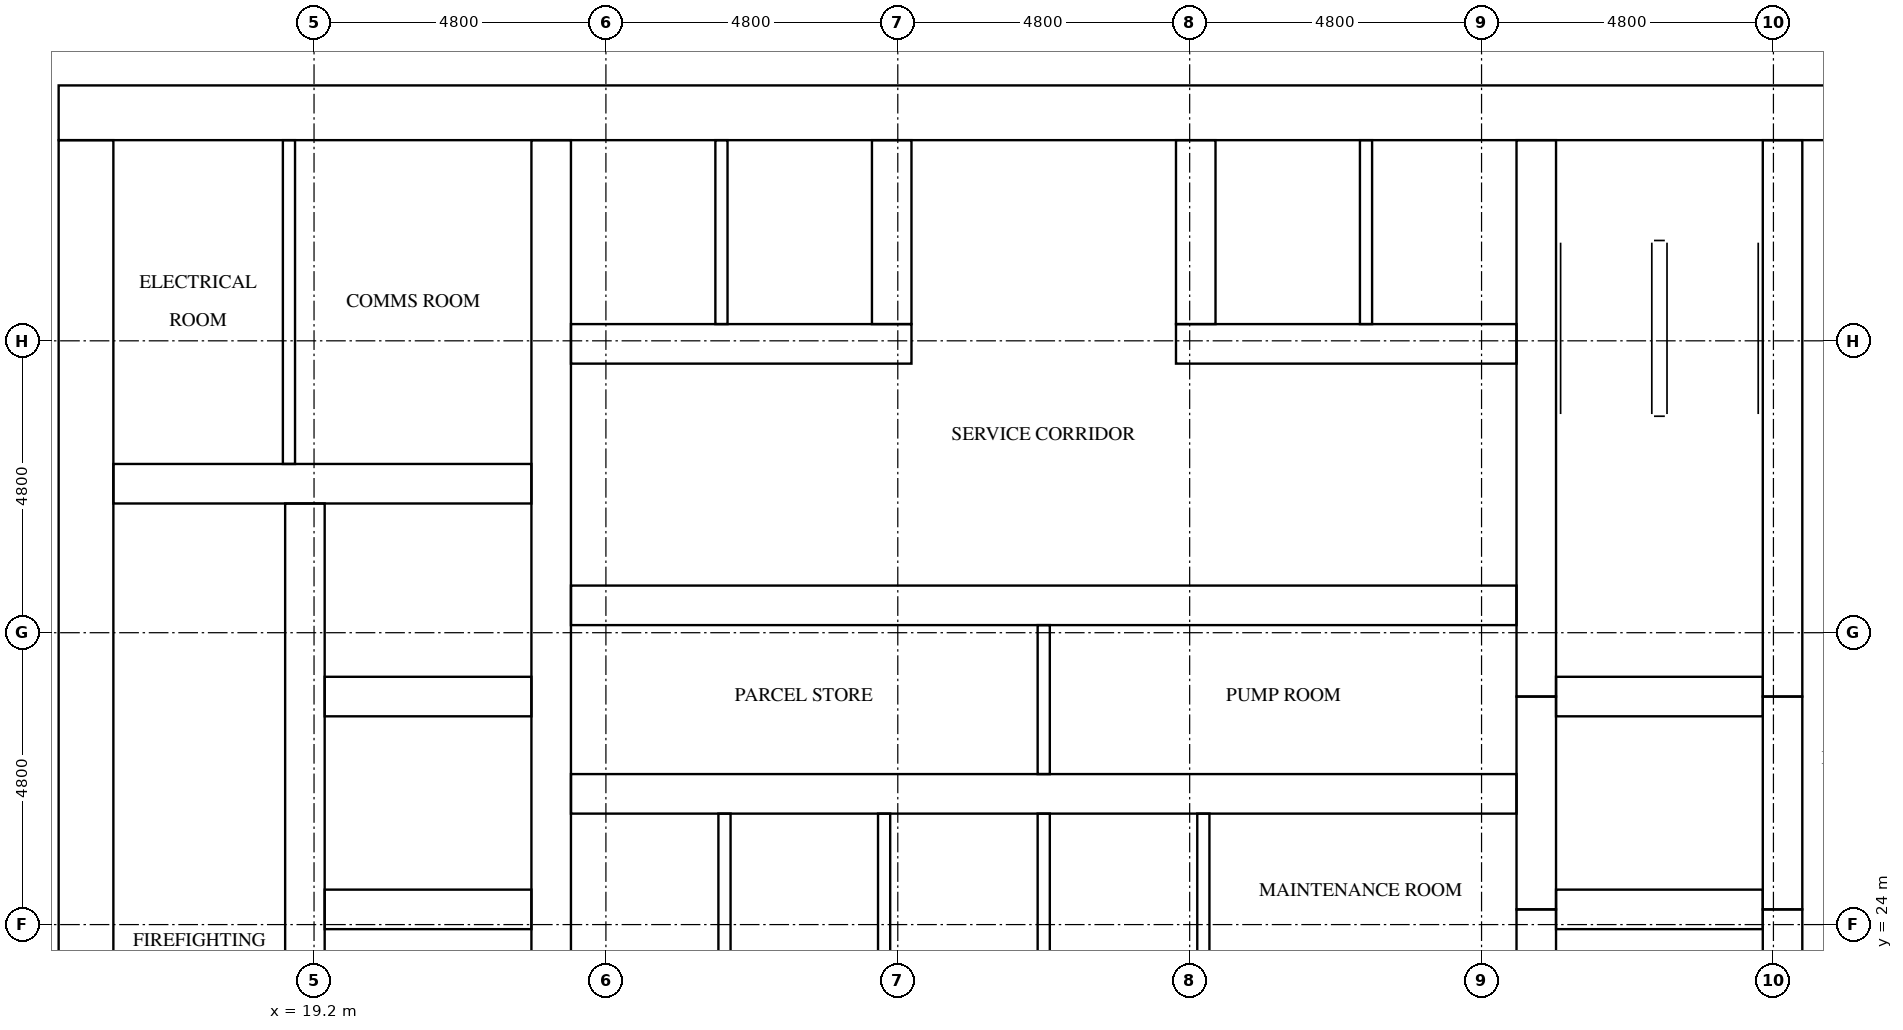
"""IFC4 building model, lengths in metres.
Left out: names, types, materials, properties, quantities, classifications, styles, units other than length and angle.
Written with IfcOpenShell. Run it as: python <this file> out.ifc"""

import sys

from ifc_helpers import new_model, si_unit, direction, frame, frame_2d, origin, place, context, subcontext, project, spatial, rectangle, extrude, element, fill, save


model = new_model("IFC4")
c1 = context("Model", 3, precision=1e-05, world=origin(), true_north=direction((0.0, 1.0)))
c2 = subcontext(c1, "Body", "Model", "MODEL_VIEW")
j1 = project(units=[si_unit("LENGTHUNIT", "METRE"), si_unit("PLANEANGLEUNIT", "RADIAN")], contexts=[c1])
p1 = place(None, origin())
s1 = spatial("IfcSite", under=j1, at=p1, CompositionType="ELEMENT")
p2 = place(p1, origin())
s2 = spatial("IfcBuilding", under=s1, at=p2, CompositionType="ELEMENT")
p3 = place(p2, frame((0.0, 0.0, 62.8)))
s3 = spatial("IfcBuildingStorey", under=s2, at=p3, CompositionType="ELEMENT", Elevation=62.8)
p4 = place(p3, frame((15.0, 37.35, 0.0), z_axis=(0.0, 0.0, 1.0), x_axis=(1.0, 0.0, 0.0)))
e1 = element("IfcWall", 1, at=p4, inside=s3, PredefinedType="SHEAR", context=c2, shape_type="SweptSolid", body=[
    extrude(rectangle(XDim=32.4, YDim=0.9, at=frame_2d((16.2, 0.0))), origin(), (0.0, 0.0, 1.0), 3.2),
])
p5 = place(p4, frame((15.3, 0.0, 0.0)))
e2 = element("IfcOpeningElement", 2, at=p5, cuts=e1, PredefinedType="OPENING", context=c2, shape_type="SweptSolid", body=[
    extrude(rectangle(XDim=1.8, YDim=2.1, at=frame_2d((0.9, 1.05))), frame((0.0, 0.46, 0.0), z_axis=(0.0, -1.0, 0.0), x_axis=(1.0, 0.0, 0.0)), (0.0, 0.0, 1.0), 0.92),
])
p6 = place(p4, frame((1.794, 0.0, 0.0)))
e3 = element("IfcOpeningElement", 3, at=p6, cuts=e1, PredefinedType="OPENING", context=c2, shape_type="SweptSolid", body=[
    extrude(rectangle(XDim=1.0, YDim=2.1, at=frame_2d((0.5, 1.05))), frame((0.0, 0.46, 0.0), z_axis=(0.0, -1.0, 0.0), x_axis=(1.0, 0.0, 0.0)), (0.0, 0.0, 1.0), 0.92),
])
p7 = place(p4, frame((5.331, 0.0, 0.0)))
e4 = element("IfcOpeningElement", 4, at=p7, cuts=e1, PredefinedType="OPENING", context=c2, shape_type="SweptSolid", body=[
    extrude(rectangle(XDim=1.0, YDim=2.1, at=frame_2d((0.5, 1.05))), frame((0.0, 0.46, 0.0), z_axis=(0.0, -1.0, 0.0), x_axis=(1.0, 0.0, 0.0)), (0.0, 0.0, 1.0), 0.92),
])
p8 = place(p3, frame((15.45, 15.9, 0.0), z_axis=(0.0, 0.0, 1.0), x_axis=(0.0, 1.0, 0.0)))
e5 = element("IfcWall", 5, at=p8, inside=s3, PredefinedType="SHEAR", context=c2, shape_type="SweptSolid", body=[
    extrude(rectangle(XDim=21.0, YDim=0.9, at=frame_2d((10.5, 0.0))), origin(), (0.0, 0.0, 1.0), 3.2),
])
p9 = place(p8, frame((4.86, 0.0, 0.0)))
e6 = element("IfcOpeningElement", 6, at=p9, cuts=e5, PredefinedType="OPENING", context=c2, shape_type="SweptSolid", body=[
    extrude(rectangle(XDim=1.2, YDim=2.1, at=frame_2d((0.6, 1.05))), frame((0.0, 0.46, 0.0), z_axis=(0.0, -1.0, 0.0), x_axis=(1.0, 0.0, 0.0)), (0.0, 0.0, 1.0), 0.92),
])
p10 = place(p3, frame((19.05, 15.9, 0.0), z_axis=(0.0, 0.0, 1.0), x_axis=(0.0, 1.0, 0.0)))
e7 = element("IfcWall", 7, at=p10, inside=s3, PredefinedType="SHEAR", context=c2, shape_type="SweptSolid", body=[
    extrude(rectangle(XDim=15.025, YDim=0.65, at=frame_2d((7.513, 0.0))), origin(), (0.0, 0.0, 1.0), 3.2),
])
p11 = place(p10, frame((9.55, 0.0, 0.0)))
e8 = element("IfcOpeningElement", 8, at=p11, cuts=e7, PredefinedType="OPENING", context=c2, shape_type="SweptSolid", body=[
    extrude(rectangle(XDim=1.1, YDim=2.1, at=frame_2d((0.55, 1.05))), frame((0.0, 0.335, 0.0), z_axis=(0.0, -1.0, 0.0), x_axis=(1.0, 0.0, 0.0)), (0.0, 0.0, 1.0), 0.67),
])
p12 = place(p10, frame((13.05, 0.0, 0.0)))
e9 = element("IfcOpeningElement", 9, at=p12, cuts=e7, PredefinedType="OPENING", context=c2, shape_type="SweptSolid", body=[
    extrude(rectangle(XDim=1.1, YDim=2.1, at=frame_2d((0.55, 1.05))), frame((0.0, 0.335, 0.0), z_axis=(0.0, -1.0, 0.0), x_axis=(1.0, 0.0, 0.0)), (0.0, 0.0, 1.0), 0.67),
])
p13 = place(p10, frame((0.3, 0.0, 0.0)))
e10 = element("IfcOpeningElement", 10, at=p13, cuts=e7, PredefinedType="OPENING", context=c2, shape_type="SweptSolid", body=[
    extrude(rectangle(XDim=1.2, YDim=2.1, at=frame_2d((0.6, 1.05))), frame((0.0, 0.335, 0.0), z_axis=(0.0, -1.0, 0.0), x_axis=(1.0, 0.0, 0.0)), (0.0, 0.0, 1.0), 0.67),
])
p14 = place(p3, frame((23.1, 15.9, 0.0), z_axis=(0.0, 0.0, 1.0), x_axis=(0.0, 1.0, 0.0)))
e11 = element("IfcWall", 11, at=p14, inside=s3, PredefinedType="SHEAR", context=c2, shape_type="SweptSolid", body=[
    extrude(rectangle(XDim=21.0, YDim=0.65, at=frame_2d((10.5, 0.0))), origin(), (0.0, 0.0, 1.0), 3.2),
])
p15 = place(p3, frame((39.3, 15.9, 0.0), z_axis=(0.0, 0.0, 1.0), x_axis=(0.0, 1.0, 0.0)))
e12 = element("IfcWall", 12, at=p15, inside=s3, PredefinedType="SHEAR", context=c2, shape_type="SweptSolid", body=[
    extrude(rectangle(XDim=8.35, YDim=0.65, at=frame_2d((4.175, 0.0))), origin(), (0.0, 0.0, 1.0), 3.2),
])
p16 = place(p3, frame((39.3, 24.25, 0.0), z_axis=(0.0, 0.0, 1.0), x_axis=(0.0, 1.0, 0.0)))
e13 = element("IfcWall", 13, at=p16, inside=s3, PredefinedType="SHEAR", context=c2, shape_type="SweptSolid", body=[
    extrude(rectangle(XDim=3.5, YDim=0.65, at=frame_2d((1.75, 0.0))), origin(), (0.0, 0.0, 1.0), 3.2),
])
p17 = place(p3, frame((39.3, 27.75, 0.0), z_axis=(0.0, 0.0, 1.0), x_axis=(0.0, 1.0, 0.0)))
e14 = element("IfcWall", 14, at=p17, inside=s3, PredefinedType="SHEAR", context=c2, shape_type="SweptSolid", body=[
    extrude(rectangle(XDim=9.15, YDim=0.65, at=frame_2d((4.575, 0.0))), origin(), (0.0, 0.0, 1.0), 3.2),
])
p18 = place(p3, frame((43.35, 15.9, 0.0), z_axis=(0.0, 0.0, 1.0), x_axis=(0.0, 1.0, 0.0)))
e15 = element("IfcWall", 15, at=p18, inside=s3, PredefinedType="SHEAR", context=c2, shape_type="SweptSolid", body=[
    extrude(rectangle(XDim=8.35, YDim=0.65, at=frame_2d((4.175, 0.0))), origin(), (0.0, 0.0, 1.0), 3.2),
])
p19 = place(p18, frame((0.3, 0.0, 0.0)))
e16 = element("IfcOpeningElement", 16, at=p19, cuts=e15, PredefinedType="OPENING", context=c2, shape_type="SweptSolid", body=[
    extrude(rectangle(XDim=1.2, YDim=2.1, at=frame_2d((0.6, 1.05))), frame((0.0, 0.335, 0.0), z_axis=(0.0, -1.0, 0.0), x_axis=(1.0, 0.0, 0.0)), (0.0, 0.0, 1.0), 0.67),
])
p20 = place(p3, frame((43.35, 24.25, 0.0), z_axis=(0.0, 0.0, 1.0), x_axis=(0.0, 1.0, 0.0)))
e17 = element("IfcWall", 17, at=p20, inside=s3, PredefinedType="SHEAR", context=c2, shape_type="SweptSolid", body=[
    extrude(rectangle(XDim=3.5, YDim=0.65, at=frame_2d((1.75, 0.0))), origin(), (0.0, 0.0, 1.0), 3.2),
])
p21 = place(p20, frame((1.2, 0.0, 0.0)))
e18 = element("IfcOpeningElement", 18, at=p21, cuts=e17, PredefinedType="OPENING", context=c2, shape_type="SweptSolid", body=[
    extrude(rectangle(XDim=1.1, YDim=2.1, at=frame_2d((0.55, 1.05))), frame((0.0, 0.335, 0.0), z_axis=(0.0, -1.0, 0.0), x_axis=(1.0, 0.0, 0.0)), (0.0, 0.0, 1.0), 0.67),
])
p22 = place(p3, frame((43.35, 27.75, 0.0), z_axis=(0.0, 0.0, 1.0), x_axis=(0.0, 1.0, 0.0)))
e19 = element("IfcWall", 19, at=p22, inside=s3, PredefinedType="SHEAR", context=c2, shape_type="SweptSolid", body=[
    extrude(rectangle(XDim=9.15, YDim=0.65, at=frame_2d((4.575, 0.0))), origin(), (0.0, 0.0, 1.0), 3.2),
])
p23 = place(p22, frame((7.65, 0.0, 0.0)))
e20 = element("IfcOpeningElement", 20, at=p23, cuts=e19, PredefinedType="OPENING", context=c2, shape_type="SweptSolid", body=[
    extrude(rectangle(XDim=1.2, YDim=2.1, at=frame_2d((0.6, 1.05))), frame((0.0, 0.335, 0.0), z_axis=(0.0, -1.0, 0.0), x_axis=(1.0, 0.0, 0.0)), (0.0, 0.0, 1.0), 0.67),
])
for number, where, z_axis, x_axis in (
    (21, (19.375, 24.25, 0.0), (0.0, 0.0, 1.0), (1.0, 0.0, 0.0)),
    (22, (19.375, 27.75, 0.0), (0.0, 0.0, 1.0), (1.0, 0.0, 0.0)),
):
    element("IfcWall", number, at=place(p3, frame(where, z_axis=z_axis, x_axis=x_axis)), inside=s3, PredefinedType="SHEAR", context=c2, shape_type="SweptSolid", body=[
        extrude(rectangle(XDim=3.4, YDim=0.65, at=frame_2d((1.7, 0.0))), origin(), (0.0, 0.0, 1.0), 3.2),
    ])
p24 = place(p3, frame((15.9, 31.25, 0.0), z_axis=(0.0, 0.0, 1.0), x_axis=(1.0, 0.0, 0.0)))
e23 = element("IfcWall", 23, at=p24, inside=s3, PredefinedType="SHEAR", context=c2, shape_type="SweptSolid", body=[
    extrude(rectangle(XDim=6.875, YDim=0.65, at=frame_2d((3.438, 0.0))), origin(), (0.0, 0.0, 1.0), 3.2),
])
for number, where, z_axis, x_axis in (
    (24, (39.625, 24.25, 0.0), (0.0, 0.0, 1.0), (1.0, 0.0, 0.0)),
    (25, (39.625, 27.75, 0.0), (0.0, 0.0, 1.0), (1.0, 0.0, 0.0)),
):
    element("IfcWall", number, at=place(p3, frame(where, z_axis=z_axis, x_axis=x_axis)), inside=s3, PredefinedType="SHEAR", context=c2, shape_type="SweptSolid", body=[
        extrude(rectangle(XDim=3.4, YDim=0.65, at=frame_2d((1.7, 0.0))), origin(), (0.0, 0.0, 1.0), 3.2),
    ])
p25 = place(p3, frame((23.425, 26.15, 0.0), z_axis=(0.0, 0.0, 1.0), x_axis=(1.0, 0.0, 0.0)))
e26 = element("IfcWall", 26, at=p25, inside=s3, PredefinedType="SHEAR", context=c2, shape_type="SweptSolid", body=[
    extrude(rectangle(XDim=15.55, YDim=0.65, at=frame_2d((7.775, 0.0))), origin(), (0.0, 0.0, 1.0), 3.2),
])
p26 = place(p3, frame((23.425, 29.25, 0.0), z_axis=(0.0, 0.0, 1.0), x_axis=(1.0, 0.0, 0.0)))
e27 = element("IfcWall", 27, at=p26, inside=s3, PredefinedType="SHEAR", context=c2, shape_type="SweptSolid", body=[
    extrude(rectangle(XDim=15.55, YDim=0.65, at=frame_2d((7.775, 0.0))), origin(), (0.0, 0.0, 1.0), 3.2),
])
p27 = place(p26, frame((3.337, 0.0, 0.0)))
e28 = element("IfcOpeningElement", 28, at=p27, cuts=e27, PredefinedType="OPENING", context=c2, shape_type="SweptSolid", body=[
    extrude(rectangle(XDim=1.0, YDim=2.1, at=frame_2d((0.5, 1.05))), frame((0.0, 0.335, 0.0), z_axis=(0.0, -1.0, 0.0), x_axis=(1.0, 0.0, 0.0)), (0.0, 0.0, 1.0), 0.67),
])
p28 = place(p26, frame((11.212, 0.0, 0.0)))
e29 = element("IfcOpeningElement", 29, at=p28, cuts=e27, PredefinedType="OPENING", context=c2, shape_type="SweptSolid", body=[
    extrude(rectangle(XDim=1.0, YDim=2.1, at=frame_2d((0.5, 1.05))), frame((0.0, 0.335, 0.0), z_axis=(0.0, -1.0, 0.0), x_axis=(1.0, 0.0, 0.0)), (0.0, 0.0, 1.0), 0.67),
])
p29 = place(p3, frame((23.425, 33.55, 0.0), z_axis=(0.0, 0.0, 1.0), x_axis=(1.0, 0.0, 0.0)))
e30 = element("IfcWall", 30, at=p29, inside=s3, PredefinedType="SHEAR", context=c2, shape_type="SweptSolid", body=[
    extrude(rectangle(XDim=5.6, YDim=0.65, at=frame_2d((2.8, 0.0))), origin(), (0.0, 0.0, 1.0), 3.2),
])
p30 = place(p3, frame((33.375, 33.55, 0.0), z_axis=(0.0, 0.0, 1.0), x_axis=(1.0, 0.0, 0.0)))
e31 = element("IfcWall", 31, at=p30, inside=s3, PredefinedType="SHEAR", context=c2, shape_type="SweptSolid", body=[
    extrude(rectangle(XDim=5.6, YDim=0.65, at=frame_2d((2.8, 0.0))), origin(), (0.0, 0.0, 1.0), 3.2),
])
for number, where, z_axis, x_axis in (
    (32, (28.7, 33.875, 0.0), (0.0, 0.0, 1.0), (0.0, 1.0, 0.0)),
    (33, (33.7, 33.875, 0.0), (0.0, 0.0, 1.0), (0.0, 1.0, 0.0)),
):
    element("IfcWall", number, at=place(p3, frame(where, z_axis=z_axis, x_axis=x_axis)), inside=s3, PredefinedType="SHEAR", context=c2, shape_type="SweptSolid", body=[
        extrude(rectangle(XDim=3.025, YDim=0.65, at=frame_2d((1.512, 0.0))), origin(), (0.0, 0.0, 1.0), 3.2),
    ])
for number, where, z_axis, x_axis in (
    (34, (25.95, 23.375, 0.0), (0.0, 0.0, 1.0), (0.0, 1.0, 0.0)),
    (35, (28.575, 23.375, 0.0), (0.0, 0.0, 1.0), (0.0, 1.0, 0.0)),
    (36, (31.2, 23.375, 0.0), (0.0, 0.0, 1.0), (0.0, 1.0, 0.0)),
    (37, (33.825, 23.375, 0.0), (0.0, 0.0, 1.0), (0.0, 1.0, 0.0)),
):
    element("IfcWall", number, at=place(p3, frame(where, z_axis=z_axis, x_axis=x_axis)), inside=s3, PredefinedType="SOLIDWALL", context=c2, shape_type="SweptSolid", body=[
        extrude(rectangle(XDim=2.45, YDim=0.2, at=frame_2d((1.225, 0.0))), origin(), (0.0, 0.0, 1.0), 3.2),
    ])
for number, where, z_axis, x_axis in (
    (38, (25.9, 33.875, 0.0), (0.0, 0.0, 1.0), (0.0, 1.0, 0.0)),
    (39, (36.5, 33.875, 0.0), (0.0, 0.0, 1.0), (0.0, 1.0, 0.0)),
):
    element("IfcWall", number, at=place(p3, frame(where, z_axis=z_axis, x_axis=x_axis)), inside=s3, PredefinedType="SOLIDWALL", context=c2, shape_type="SweptSolid", body=[
        extrude(rectangle(XDim=3.025, YDim=0.2, at=frame_2d((1.512, 0.0))), origin(), (0.0, 0.0, 1.0), 3.2),
    ])
p31 = place(p3, frame((18.788, 31.575, 0.0), z_axis=(0.0, 0.0, 1.0), x_axis=(0.0, 1.0, 0.0)))
e40 = element("IfcWall", 40, at=p31, inside=s3, PredefinedType="PARTITIONING", context=c2, shape_type="SweptSolid", body=[
    extrude(rectangle(XDim=5.325, YDim=0.2, at=frame_2d((2.663, 0.0))), origin(), (0.0, 0.0, 1.0), 3.2),
])
p32 = place(p3, frame((31.2, 26.475, 0.0), z_axis=(0.0, 0.0, 1.0), x_axis=(0.0, 1.0, 0.0)))
e41 = element("IfcWall", 41, at=p32, inside=s3, PredefinedType="PARTITIONING", context=c2, shape_type="SweptSolid", body=[
    extrude(rectangle(XDim=2.45, YDim=0.2, at=frame_2d((1.225, 0.0))), origin(), (0.0, 0.0, 1.0), 3.2),
])
p33 = place(p11, origin())
e42 = element("IfcDoor", 42, at=p33, inside=s3, OperationType="DOUBLE_DOOR_SLIDING", PredefinedType="DOOR", context=c2, shape_type="SweptSolid", body=[
    extrude(rectangle(XDim=1.1, YDim=2.1, at=frame_2d((0.55, 1.05))), frame((0.0, 0.025, 0.0), z_axis=(0.0, -1.0, 0.0), x_axis=(1.0, 0.0, 0.0)), (0.0, 0.0, 1.0), 0.05),
])
fill(e8, e42)
p34 = place(p12, origin())
e43 = element("IfcDoor", 43, at=p34, inside=s3, OperationType="DOUBLE_DOOR_SLIDING", PredefinedType="DOOR", context=c2, shape_type="SweptSolid", body=[
    extrude(rectangle(XDim=1.1, YDim=2.1, at=frame_2d((0.55, 1.05))), frame((0.0, 0.025, 0.0), z_axis=(0.0, -1.0, 0.0), x_axis=(1.0, 0.0, 0.0)), (0.0, 0.0, 1.0), 0.05),
])
fill(e9, e43)
p35 = place(p21, origin())
e44 = element("IfcDoor", 44, at=p35, inside=s3, OperationType="DOUBLE_DOOR_SLIDING", PredefinedType="DOOR", context=c2, shape_type="SweptSolid", body=[
    extrude(rectangle(XDim=1.1, YDim=2.1, at=frame_2d((0.55, 1.05))), frame((0.0, 0.025, 0.0), z_axis=(0.0, -1.0, 0.0), x_axis=(1.0, 0.0, 0.0)), (0.0, 0.0, 1.0), 0.05),
])
fill(e18, e44)
p36 = place(p23, origin())
e45 = element("IfcDoor", 45, at=p36, inside=s3, OperationType="SINGLE_SWING_LEFT", PredefinedType="DOOR", context=c2, shape_type="SweptSolid", body=[
    extrude(rectangle(XDim=1.2, YDim=2.1, at=frame_2d((0.6, 1.05))), frame((0.0, 0.025, 0.0), z_axis=(0.0, -1.0, 0.0), x_axis=(1.0, 0.0, 0.0)), (0.0, 0.0, 1.0), 0.05),
])
fill(e20, e45)
p37 = place(p5, origin())
e46 = element("IfcDoor", 46, at=p37, inside=s3, OperationType="DOUBLE_DOOR_SINGLE_SWING", PredefinedType="DOOR", context=c2, shape_type="SweptSolid", body=[
    extrude(rectangle(XDim=1.8, YDim=2.1, at=frame_2d((0.9, 1.05))), frame((0.0, 0.025, 0.0), z_axis=(0.0, -1.0, 0.0), x_axis=(1.0, 0.0, 0.0)), (0.0, 0.0, 1.0), 0.05),
])
fill(e2, e46)
p38 = place(p6, origin())
e47 = element("IfcDoor", 47, at=p38, inside=s3, OperationType="SINGLE_SWING_RIGHT", PredefinedType="DOOR", context=c2, shape_type="SweptSolid", body=[
    extrude(rectangle(XDim=1.0, YDim=2.1, at=frame_2d((0.5, 1.05))), frame((0.0, 0.025, 0.0), z_axis=(0.0, -1.0, 0.0), x_axis=(1.0, 0.0, 0.0)), (0.0, 0.0, 1.0), 0.05),
])
fill(e3, e47)
p39 = place(p7, origin())
e48 = element("IfcDoor", 48, at=p39, inside=s3, OperationType="SINGLE_SWING_LEFT", PredefinedType="DOOR", context=c2, shape_type="SweptSolid", body=[
    extrude(rectangle(XDim=1.0, YDim=2.1, at=frame_2d((0.5, 1.05))), frame((0.0, 0.025, 0.0), z_axis=(0.0, -1.0, 0.0), x_axis=(1.0, 0.0, 0.0)), (0.0, 0.0, 1.0), 0.05),
])
fill(e4, e48)
p40 = place(p27, origin())
e49 = element("IfcDoor", 49, at=p40, inside=s3, OperationType="SINGLE_SWING_LEFT", PredefinedType="DOOR", context=c2, shape_type="SweptSolid", body=[
    extrude(rectangle(XDim=1.0, YDim=2.1, at=frame_2d((0.5, 1.05))), frame((0.0, 0.025, 0.0), z_axis=(0.0, -1.0, 0.0), x_axis=(1.0, 0.0, 0.0)), (0.0, 0.0, 1.0), 0.05),
])
fill(e28, e49)
p41 = place(p28, origin())
e50 = element("IfcDoor", 50, at=p41, inside=s3, OperationType="SINGLE_SWING_RIGHT", PredefinedType="DOOR", context=c2, shape_type="SweptSolid", body=[
    extrude(rectangle(XDim=1.0, YDim=2.1, at=frame_2d((0.5, 1.05))), frame((0.0, 0.025, 0.0), z_axis=(0.0, -1.0, 0.0), x_axis=(1.0, 0.0, 0.0)), (0.0, 0.0, 1.0), 0.05),
])
fill(e29, e50)
save(model, sys.argv[1])
